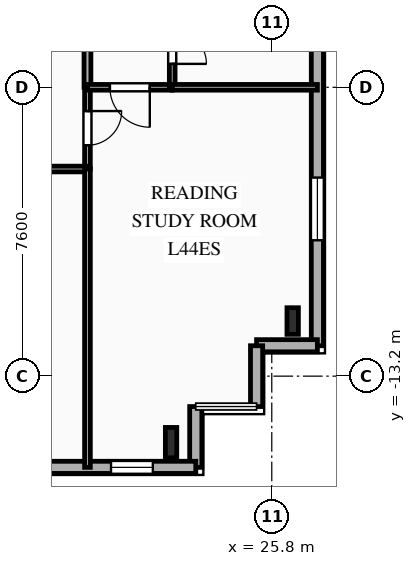
"""IFC4 building model, lengths in metres.
Left out: names, types, materials, properties, quantities, classifications, styles, units other than length and angle.
Written with IfcOpenShell. Run it as: python <this file> out.ifc"""

import sys

from ifc_helpers import new_model, si_unit, direction, frame, frame_2d, origin, origin_2d, place, context, subcontext, project, spatial, rectangle, i_section, extrude, element, fill, save


model = new_model("IFC4")
c1 = context("Model", 3, precision=1e-05, world=origin(), true_north=direction((0.0, 1.0)))
c2 = subcontext(c1, "Body", "Model", "MODEL_VIEW")
j1 = project(units=[si_unit("LENGTHUNIT", "METRE"), si_unit("PLANEANGLEUNIT", "RADIAN")], contexts=[c1])
p1 = place(None, origin())
s1 = spatial("IfcSite", under=j1, at=p1, CompositionType="ELEMENT")
p2 = place(p1, origin())
s2 = spatial("IfcBuilding", under=s1, at=p2, CompositionType="ELEMENT")
p3 = place(p2, frame((0.0, 0.0, 157.8)))
s3 = spatial("IfcBuildingStorey", under=s2, at=p3, CompositionType="ELEMENT", Elevation=157.8)
p4 = place(p3, frame((23.15, -14.95, 0.0), z_axis=(0.0, 0.0, 1.0), x_axis=(1.0, 0.0, 0.0)))
e1 = element("IfcColumn", 1, at=p4, inside=s3, PredefinedType="COLUMN", context=c2, shape_type="SweptSolid", body=[
    extrude(i_section(OverallWidth=0.3, OverallDepth=0.8, WebThickness=0.018, FlangeThickness=0.033, FilletRadius=0.03, at=origin_2d()), origin(), (0.0, 0.0, 1.0), 3.35),
])
p5 = place(p3, frame((26.35, -11.75, 0.0), z_axis=(0.0, 0.0, 1.0), x_axis=(1.0, 0.0, 0.0)))
e2 = element("IfcColumn", 2, at=p5, inside=s3, PredefinedType="COLUMN", context=c2, shape_type="SweptSolid", body=[
    extrude(i_section(OverallWidth=0.3, OverallDepth=0.7, WebThickness=0.017, FlangeThickness=0.032, FilletRadius=0.027, at=origin_2d()), origin(), (0.0, 0.0, 1.0), 3.35),
])
p6 = place(p3, frame((27.0, 17.2, 0.0), z_axis=(0.0, 0.0, 1.0), x_axis=(0.0, -1.0, 0.0)))
e3 = element("IfcWall", 3, at=p6, inside=s3, PredefinedType="SOLIDWALL", context=c2, shape_type="SweptSolid", body=[
    extrude(rectangle(XDim=29.6, YDim=0.32, at=frame_2d((14.8, 0.0))), origin(), (0.0, 0.0, 1.0), 3.04),
])
p7 = place(p6, frame((3.775, 0.0, 0.85)))
e4 = element("IfcOpeningElement", 4, at=p7, cuts=e3, PredefinedType="OPENING", context=c2, shape_type="SweptSolid", body=[
    extrude(rectangle(XDim=1.65, YDim=1.85, at=frame_2d((0.825, 0.925))), frame((0.0, 0.17, 0.0), z_axis=(0.0, -1.0, 0.0), x_axis=(1.0, 0.0, 0.0)), (0.0, 0.0, 1.0), 0.34),
])
p8 = place(p6, frame((9.37, 0.0, 0.85)))
e5 = element("IfcOpeningElement", 5, at=p8, cuts=e3, PredefinedType="OPENING", context=c2, shape_type="SweptSolid", body=[
    extrude(rectangle(XDim=1.5, YDim=1.85, at=frame_2d((0.75, 0.925))), frame((0.0, 0.17, 0.0), z_axis=(0.0, -1.0, 0.0), x_axis=(1.0, 0.0, 0.0)), (0.0, 0.0, 1.0), 0.34),
])
p9 = place(p6, frame((12.25, 0.0, 0.85)))
e6 = element("IfcOpeningElement", 6, at=p9, cuts=e3, PredefinedType="OPENING", context=c2, shape_type="SweptSolid", body=[
    extrude(rectangle(XDim=1.5, YDim=1.85, at=frame_2d((0.75, 0.925))), frame((0.0, 0.17, 0.0), z_axis=(0.0, -1.0, 0.0), x_axis=(1.0, 0.0, 0.0)), (0.0, 0.0, 1.0), 0.34),
])
p10 = place(p6, frame((15.05, 0.0, 0.85)))
e7 = element("IfcOpeningElement", 7, at=p10, cuts=e3, PredefinedType="OPENING", context=c2, shape_type="SweptSolid", body=[
    extrude(rectangle(XDim=1.5, YDim=1.85, at=frame_2d((0.75, 0.925))), frame((0.0, 0.17, 0.0), z_axis=(0.0, -1.0, 0.0), x_axis=(1.0, 0.0, 0.0)), (0.0, 0.0, 1.0), 0.34),
])
p11 = place(p6, frame((17.865, 0.0, 0.85)))
e8 = element("IfcOpeningElement", 8, at=p11, cuts=e3, PredefinedType="OPENING", context=c2, shape_type="SweptSolid", body=[
    extrude(rectangle(XDim=1.95, YDim=1.85, at=frame_2d((0.975, 0.925))), frame((0.0, 0.17, 0.0), z_axis=(0.0, -1.0, 0.0), x_axis=(1.0, 0.0, 0.0)), (0.0, 0.0, 1.0), 0.34),
])
p12 = place(p6, frame((25.175, 0.0, 0.85)))
e9 = element("IfcOpeningElement", 9, at=p12, cuts=e3, PredefinedType="OPENING", context=c2, shape_type="SweptSolid", body=[
    extrude(rectangle(XDim=1.65, YDim=1.85, at=frame_2d((0.825, 0.925))), frame((0.0, 0.17, 0.0), z_axis=(0.0, -1.0, 0.0), x_axis=(1.0, 0.0, 0.0)), (0.0, 0.0, 1.0), 0.34),
])
for number, where, z_axis, x_axis in (
    (10, (27.0, -12.4, 0.0), (0.0, 0.0, 1.0), (-1.0, 0.0, 0.0)),
    (11, (25.4, -12.4, 0.0), (0.0, 0.0, 1.0), (0.0, -1.0, 0.0)),
    (12, (23.8, -14.0, 0.0), (0.0, 0.0, 1.0), (0.0, -1.0, 0.0)),
):
    element("IfcWall", number, at=place(p3, frame(where, z_axis=z_axis, x_axis=x_axis)), inside=s3, PredefinedType="SOLIDWALL", context=c2, shape_type="SweptSolid", body=[
        extrude(rectangle(XDim=1.6, YDim=0.32, at=frame_2d((0.8, 0.0))), origin(), (0.0, 0.0, 1.0), 3.04),
    ])
p13 = place(p3, frame((23.8, -15.6, 0.0), z_axis=(0.0, 0.0, 1.0), x_axis=(-1.0, 0.0, 0.0)))
e13 = element("IfcWall", 13, at=p13, inside=s3, PredefinedType="SOLIDWALL", context=c2, shape_type="SweptSolid", body=[
    extrude(rectangle(XDim=49.6, YDim=0.32, at=frame_2d((24.8, 0.0))), origin(), (0.0, 0.0, 1.0), 3.04),
])
p14 = place(p13, frame((1.13, 0.0, 0.85)))
e14 = element("IfcOpeningElement", 14, at=p14, cuts=e13, PredefinedType="OPENING", context=c2, shape_type="SweptSolid", body=[
    extrude(rectangle(XDim=1.1, YDim=1.85, at=frame_2d((0.55, 0.925))), frame((0.0, 0.17, 0.0), z_axis=(0.0, -1.0, 0.0), x_axis=(1.0, 0.0, 0.0)), (0.0, 0.0, 1.0), 0.34),
])
p15 = place(p13, frame((5.295, 0.0, 0.85)))
e15 = element("IfcOpeningElement", 15, at=p15, cuts=e13, PredefinedType="OPENING", context=c2, shape_type="SweptSolid", body=[
    extrude(rectangle(XDim=1.65, YDim=1.85, at=frame_2d((0.825, 0.925))), frame((0.0, 0.17, 0.0), z_axis=(0.0, -1.0, 0.0), x_axis=(1.0, 0.0, 0.0)), (0.0, 0.0, 1.0), 0.34),
])
p16 = place(p13, frame((11.74, 0.0, 0.85)))
e16 = element("IfcOpeningElement", 16, at=p16, cuts=e13, PredefinedType="OPENING", context=c2, shape_type="SweptSolid", body=[
    extrude(rectangle(XDim=2.2, YDim=1.85, at=frame_2d((1.1, 0.925))), frame((0.0, 0.17, 0.0), z_axis=(0.0, -1.0, 0.0), x_axis=(1.0, 0.0, 0.0)), (0.0, 0.0, 1.0), 0.34),
])
p17 = place(p13, frame((18.74, 0.0, 0.85)))
e17 = element("IfcOpeningElement", 17, at=p17, cuts=e13, PredefinedType="OPENING", context=c2, shape_type="SweptSolid", body=[
    extrude(rectangle(XDim=2.2, YDim=1.85, at=frame_2d((1.1, 0.925))), frame((0.0, 0.17, 0.0), z_axis=(0.0, -1.0, 0.0), x_axis=(1.0, 0.0, 0.0)), (0.0, 0.0, 1.0), 0.34),
])
p18 = place(p13, frame((25.74, 0.0, 0.85)))
e18 = element("IfcOpeningElement", 18, at=p18, cuts=e13, PredefinedType="OPENING", context=c2, shape_type="SweptSolid", body=[
    extrude(rectangle(XDim=2.2, YDim=1.85, at=frame_2d((1.1, 0.925))), frame((0.0, 0.17, 0.0), z_axis=(0.0, -1.0, 0.0), x_axis=(1.0, 0.0, 0.0)), (0.0, 0.0, 1.0), 0.34),
])
p19 = place(p13, frame((33.348, 0.0, 0.85)))
e19 = element("IfcOpeningElement", 19, at=p19, cuts=e13, PredefinedType="OPENING", context=c2, shape_type="SweptSolid", body=[
    extrude(rectangle(XDim=2.2, YDim=1.85, at=frame_2d((1.1, 0.925))), frame((0.0, 0.17, 0.0), z_axis=(0.0, -1.0, 0.0), x_axis=(1.0, 0.0, 0.0)), (0.0, 0.0, 1.0), 0.34),
])
p20 = place(p13, frame((38.972, 0.0, 0.85)))
e20 = element("IfcOpeningElement", 20, at=p20, cuts=e13, PredefinedType="OPENING", context=c2, shape_type="SweptSolid", body=[
    extrude(rectangle(XDim=1.65, YDim=1.85, at=frame_2d((0.825, 0.925))), frame((0.0, 0.17, 0.0), z_axis=(0.0, -1.0, 0.0), x_axis=(1.0, 0.0, 0.0)), (0.0, 0.0, 1.0), 0.34),
])
p21 = place(p13, frame((45.895, 0.0, 0.85)))
e21 = element("IfcOpeningElement", 21, at=p21, cuts=e13, PredefinedType="OPENING", context=c2, shape_type="SweptSolid", body=[
    extrude(rectangle(XDim=1.65, YDim=1.85, at=frame_2d((0.825, 0.925))), frame((0.0, 0.17, 0.0), z_axis=(0.0, -1.0, 0.0), x_axis=(1.0, 0.0, 0.0)), (0.0, 0.0, 1.0), 0.34),
])
p22 = place(p3, frame((20.95, -5.6, 0.0), z_axis=(0.0, 0.0, 1.0), x_axis=(0.0, -1.0, 0.0)))
e22 = element("IfcWall", 22, at=p22, inside=s3, PredefinedType="PARTITIONING", context=c2, shape_type="SweptSolid", body=[
    extrude(rectangle(XDim=2.15, YDim=0.15, at=frame_2d((1.075, 0.0))), origin(), (0.0, 0.0, 1.0), 3.04),
])
p23 = place(p22, frame((0.625, 0.0, 0.0)))
e23 = element("IfcOpeningElement", 23, at=p23, cuts=e22, PredefinedType="OPENING", context=c2, shape_type="SweptSolid", body=[
    extrude(rectangle(XDim=0.9, YDim=2.1, at=frame_2d((0.45, 1.05))), frame((0.0, 0.085, 0.0), z_axis=(0.0, -1.0, 0.0), x_axis=(1.0, 0.0, 0.0)), (0.0, 0.0, 1.0), 0.17),
])
p24 = place(p3, frame((20.95, -7.75, 0.0), z_axis=(0.0, 0.0, 1.0), x_axis=(-1.0, 0.0, 0.0)))
e24 = element("IfcWall", 24, at=p24, inside=s3, PredefinedType="PARTITIONING", context=c2, shape_type="SweptSolid", body=[
    extrude(rectangle(XDim=6.483, YDim=0.15, at=frame_2d((3.241, 0.0))), origin(), (0.0, 0.0, 1.0), 3.04),
])
p25 = place(p24, frame((4.319, 0.0, 0.0)))
e25 = element("IfcOpeningElement", 25, at=p25, cuts=e24, PredefinedType="OPENING", context=c2, shape_type="SweptSolid", body=[
    extrude(rectangle(XDim=1.05, YDim=2.15, at=frame_2d((0.525, 1.075))), frame((0.0, 0.085, 0.0), z_axis=(0.0, -1.0, 0.0), x_axis=(1.0, 0.0, 0.0)), (0.0, 0.0, 1.0), 0.17),
])
p26 = place(p3, frame((20.95, 8.5, 0.0), z_axis=(0.0, 0.0, 1.0), x_axis=(0.0, -1.0, 0.0)))
e26 = element("IfcWall", 26, at=p26, inside=s3, PredefinedType="PARTITIONING", context=c2, shape_type="SweptSolid", body=[
    extrude(rectangle(XDim=14.1, YDim=0.18, at=frame_2d((7.05, 0.0))), origin(), (0.0, 0.0, 1.0), 3.04),
])
p27 = place(p26, frame((8.042, 0.0, 0.0)))
e27 = element("IfcOpeningElement", 27, at=p27, cuts=e26, PredefinedType="OPENING", context=c2, shape_type="SweptSolid", body=[
    extrude(rectangle(XDim=1.0, YDim=2.15, at=frame_2d((0.5, 1.075))), frame((0.0, 0.1, 0.0), z_axis=(0.0, -1.0, 0.0), x_axis=(1.0, 0.0, 0.0)), (0.0, 0.0, 1.0), 0.2),
])
p28 = place(p3, frame((23.18, -5.6, 0.0), z_axis=(0.0, 0.0, 1.0), x_axis=(-1.0, 0.0, 0.0)))
e28 = element("IfcWall", 28, at=p28, inside=s3, PredefinedType="PARTITIONING", context=c2, shape_type="SweptSolid", body=[
    extrude(rectangle(XDim=2.23, YDim=0.15, at=frame_2d((1.115, 0.0))), origin(), (0.0, 0.0, 1.0), 3.04),
])
p29 = place(p28, frame((0.59, 0.0, 0.0)))
e29 = element("IfcOpeningElement", 29, at=p29, cuts=e28, PredefinedType="OPENING", context=c2, shape_type="SweptSolid", body=[
    extrude(rectangle(XDim=1.05, YDim=2.15, at=frame_2d((0.525, 1.075))), frame((0.0, 0.085, 0.0), z_axis=(0.0, -1.0, 0.0), x_axis=(1.0, 0.0, 0.0)), (0.0, 0.0, 1.0), 0.17),
])
p30 = place(p3, frame((23.18, -3.25, 0.0), z_axis=(0.0, 0.0, 1.0), x_axis=(0.0, -1.0, 0.0)))
e30 = element("IfcWall", 30, at=p30, inside=s3, PredefinedType="PLUMBINGWALL", context=c2, shape_type="SweptSolid", body=[
    extrude(rectangle(XDim=2.35, YDim=0.15, at=frame_2d((1.175, 0.0))), origin(), (0.0, 0.0, 1.0), 3.04),
])
p31 = place(p30, frame((0.834, 0.0, 0.0)))
e31 = element("IfcOpeningElement", 31, at=p31, cuts=e30, PredefinedType="OPENING", context=c2, shape_type="SweptSolid", body=[
    extrude(rectangle(XDim=0.9, YDim=2.1, at=frame_2d((0.45, 1.05))), frame((0.0, 0.085, 0.0), z_axis=(0.0, -1.0, 0.0), x_axis=(1.0, 0.0, 0.0)), (0.0, 0.0, 1.0), 0.17),
])
p32 = place(p3, frame((23.18, -5.6, 0.0), z_axis=(0.0, 0.0, 1.0), x_axis=(1.0, 0.0, 0.0)))
e32 = element("IfcWall", 32, at=p32, inside=s3, PredefinedType="PLUMBINGWALL", context=c2, shape_type="SweptSolid", body=[
    extrude(rectangle(XDim=3.82, YDim=0.15, at=frame_2d((1.91, 0.0))), origin(), (0.0, 0.0, 1.0), 3.04),
])
p33 = place(p3, frame((20.95, -15.6, 0.0), z_axis=(0.0, 0.0, 1.0), x_axis=(0.0, 1.0, 0.0)))
e33 = element("IfcWall", 33, at=p33, inside=s3, PredefinedType="PARTITIONING", context=c2, shape_type="SweptSolid", body=[
    extrude(rectangle(XDim=7.85, YDim=0.15, at=frame_2d((3.925, 0.0))), origin(), (0.0, 0.0, 1.0), 3.04),
])
p34 = place(p12, origin())
e34 = element("IfcWindow", 34, at=p34, inside=s3, PartitioningType="SINGLE_PANEL", PredefinedType="WINDOW", context=c2, shape_type="SweptSolid", body=[
    extrude(rectangle(XDim=1.65, YDim=1.85, at=frame_2d((0.825, 0.925))), frame((0.0, 0.03, 0.0), z_axis=(0.0, -1.0, 0.0), x_axis=(1.0, 0.0, 0.0)), (0.0, 0.0, 1.0), 0.06),
])
fill(e9, e34)
p35 = place(p14, origin())
e35 = element("IfcWindow", 35, at=p35, inside=s3, PartitioningType="SINGLE_PANEL", PredefinedType="WINDOW", context=c2, shape_type="SweptSolid", body=[
    extrude(rectangle(XDim=1.1, YDim=1.85, at=frame_2d((0.55, 0.925))), frame((0.0, 0.03, 0.0), z_axis=(0.0, -1.0, 0.0), x_axis=(1.0, 0.0, 0.0)), (0.0, 0.0, 1.0), 0.06),
])
fill(e14, e35)
p36 = place(p23, origin())
e36 = element("IfcDoor", 36, at=p36, inside=s3, OperationType="SINGLE_SWING_LEFT", PredefinedType="DOOR", context=c2, shape_type="SweptSolid", body=[
    extrude(rectangle(XDim=0.9, YDim=2.1, at=frame_2d((0.45, 1.05))), frame((0.0, 0.025, 0.0), z_axis=(0.0, -1.0, 0.0), x_axis=(1.0, 0.0, 0.0)), (0.0, 0.0, 1.0), 0.05),
])
fill(e23, e36)
p37 = place(p29, origin())
e37 = element("IfcDoor", 37, at=p37, inside=s3, OperationType="SINGLE_SWING_LEFT", PredefinedType="DOOR", context=c2, shape_type="SweptSolid", body=[
    extrude(rectangle(XDim=1.05, YDim=2.15, at=frame_2d((0.525, 1.075))), frame((0.0, 0.025, 0.0), z_axis=(0.0, -1.0, 0.0), x_axis=(1.0, 0.0, 0.0)), (0.0, 0.0, 1.0), 0.05),
])
fill(e29, e37)
p38 = place(p31, origin())
e38 = element("IfcDoor", 38, at=p38, inside=s3, OperationType="SINGLE_SWING_RIGHT", PredefinedType="DOOR", context=c2, shape_type="SweptSolid", body=[
    extrude(rectangle(XDim=0.9, YDim=2.1, at=frame_2d((0.45, 1.05))), frame((0.0, 0.025, 0.0), z_axis=(0.0, -1.0, 0.0), x_axis=(1.0, 0.0, 0.0)), (0.0, 0.0, 1.0), 0.05),
])
fill(e31, e38)
save(model, sys.argv[1])
